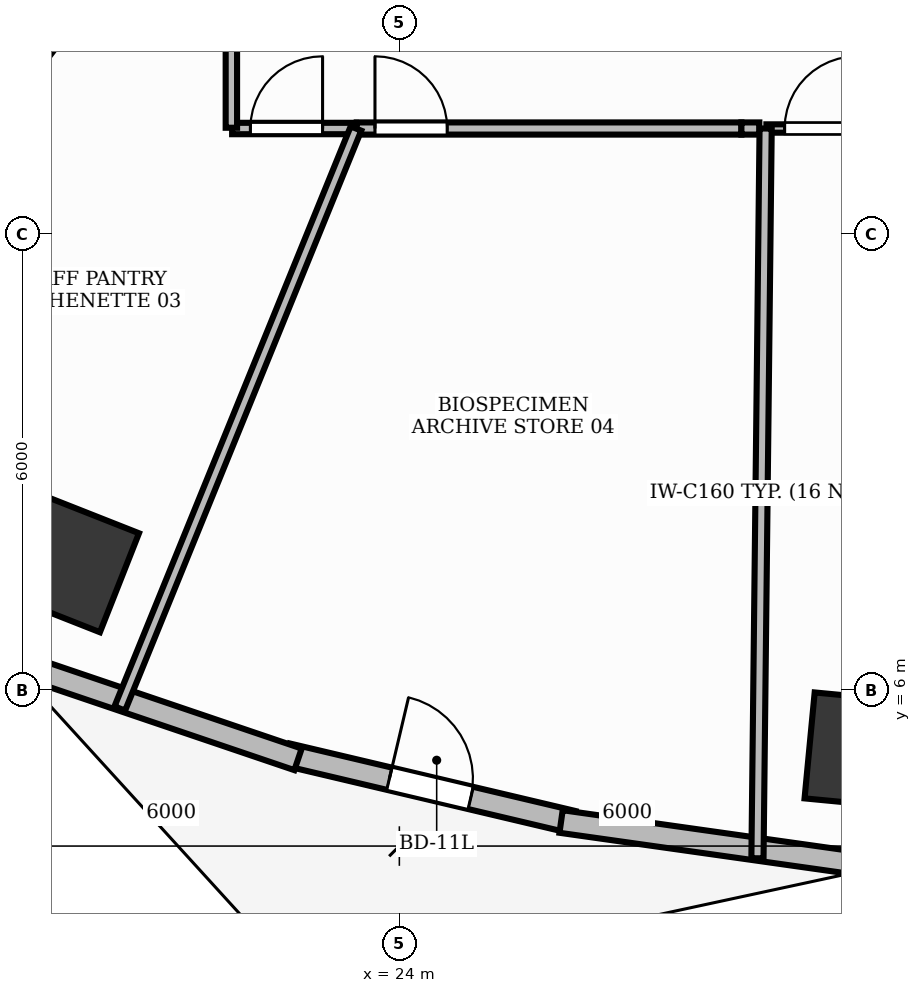
"""IFC4 building model, lengths in metres.
Left out: names, types, materials, properties, quantities, classifications, styles, units other than length and angle.
Written with IfcOpenShell. Run it as: python <this file> out.ifc"""

import sys

from ifc_helpers import new_model, si_unit, direction, frame, frame_2d, origin, origin_2d, place, context, subcontext, project, spatial, rectangle, extrude, element, fill, save


model = new_model("IFC4")
c1 = context("Model", 3, precision=1e-05, world=origin(), true_north=direction((0.0, 1.0)))
c2 = subcontext(c1, "Body", "Model", "MODEL_VIEW")
j1 = project(units=[si_unit("LENGTHUNIT", "METRE"), si_unit("PLANEANGLEUNIT", "RADIAN")], contexts=[c1])
p1 = place(None, origin())
s1 = spatial("IfcSite", under=j1, at=p1, CompositionType="ELEMENT")
p2 = place(p1, origin())
s2 = spatial("IfcBuilding", under=s1, at=p2, CompositionType="ELEMENT")
p3 = place(p2, frame((0.0, 0.0, 42.6)))
s3 = spatial("IfcBuildingStorey", under=s2, at=p3, CompositionType="ELEMENT", Elevation=42.6)
for number, where, z_axis, x_axis in (
    (1, (19.667, 7.671, -0.0), (0.0, 0.0, 1.0), (-0.93, 0.367, 0.0)),
    (2, (30.094, 5.208, -0.0), (0.0, 0.0, 1.0), (-0.995, 0.095, 0.0)),
):
    element("IfcColumn", number, at=place(p3, frame(where, z_axis=z_axis, x_axis=x_axis)), inside=s3, PredefinedType="COLUMN", context=c2, shape_type="SweptSolid", body=[
        extrude(rectangle(XDim=1.4, YDim=1.4, at=origin_2d()), origin(), (0.0, 0.0, 1.0), 3.901),
    ])
p4 = place(p3, frame((22.525, 5.153, 0.0), z_axis=(0.0, 0.0, 1.0), x_axis=(0.973186156802, -0.230018921417, 0.0)))
e3 = element("IfcWall", 3, at=p4, inside=s3, PredefinedType="STANDARD", context=c2, shape_type="SweptSolid", body=[
    extrude(rectangle(XDim=3.861, YDim=0.3, at=frame_2d((1.931, 0.0))), origin(), (0.0, 0.0, 1.0), 3.9),
])
p5 = place(p4, frame((1.381, 0.0, 0.0)))
e4 = element("IfcOpeningElement", 4, at=p5, cuts=e3, PredefinedType="OPENING", context=c2, shape_type="SweptSolid", body=[
    extrude(rectangle(XDim=1.1, YDim=2.15, at=frame_2d((0.55, 1.075))), frame((0.0, 0.165, 0.0), z_axis=(0.0, -1.0, 0.0), x_axis=(1.0, 0.0, 0.0)), (0.0, 0.0, 1.0), 0.33),
])
p6 = place(p3, frame((19.04, 6.321, 0.0), z_axis=(0.0, 0.0, 1.0), x_axis=(0.94702579403, -0.321157508773, 0.0)))
e5 = element("IfcWall", 5, at=p6, inside=s3, PredefinedType="STANDARD", context=c2, shape_type="SweptSolid", body=[
    extrude(rectangle(XDim=3.83, YDim=0.3, at=frame_2d((1.915, 0.0))), origin(), (0.0, 0.0, 1.0), 3.9),
])
p7 = place(p3, frame((26.128, 4.273, 0.0), z_axis=(0.0, 0.0, 1.0), x_axis=(0.990165832998, -0.139898617443, 0.0)))
e6 = element("IfcWall", 6, at=p7, inside=s3, PredefinedType="STANDARD", context=c2, shape_type="SweptSolid", body=[
    extrude(rectangle(XDim=3.951, YDim=0.3, at=frame_2d((1.976, 0.0))), origin(), (0.0, 0.0, 1.0), 3.9),
])
p8 = place(p3, frame((21.8, 13.39, 0.0), z_axis=(0.0, 0.0, 1.0), x_axis=(1.0, 0.0, 0.0)))
e7 = element("IfcWall", 7, at=p8, inside=s3, PredefinedType="PARTITIONING", context=c2, shape_type="SweptSolid", body=[
    extrude(rectangle(XDim=1.629, YDim=0.15, at=frame_2d((0.814, 0.0))), origin(), (0.0, 0.0, 1.0), 2.91),
])
p9 = place(p8, frame((0.24, 0.0, 0.0)))
e8 = element("IfcOpeningElement", 8, at=p9, cuts=e7, PredefinedType="OPENING", context=c2, shape_type="SweptSolid", body=[
    extrude(rectangle(XDim=0.95, YDim=2.15, at=frame_2d((0.475, 1.075))), frame((0.0, 0.09, 0.0), z_axis=(0.0, -1.0, 0.0), x_axis=(1.0, 0.0, 0.0)), (0.0, 0.0, 1.0), 0.18),
])
p10 = place(p3, frame((23.439, 13.39, 0.0), z_axis=(0.0, 0.0, 1.0), x_axis=(1.0, 0.0, 0.0)))
e9 = element("IfcWall", 9, at=p10, inside=s3, PredefinedType="PARTITIONING", context=c2, shape_type="SweptSolid", body=[
    extrude(rectangle(XDim=5.061, YDim=0.16, at=frame_2d((2.53, 0.0))), origin(), (0.0, 0.0, 1.0), 2.91),
])
p11 = place(p10, frame((0.24, 0.0, 0.0)))
e10 = element("IfcOpeningElement", 10, at=p11, cuts=e9, PredefinedType="OPENING", context=c2, shape_type="SweptSolid", body=[
    extrude(rectangle(XDim=0.95, YDim=2.15, at=frame_2d((0.475, 1.075))), frame((0.0, 0.095, 0.0), z_axis=(0.0, -1.0, 0.0), x_axis=(1.0, 0.0, 0.0)), (0.0, 0.0, 1.0), 0.19),
])
p12 = place(p3, frame((28.829, 13.39, 0.0), z_axis=(0.0, 0.0, 1.0), x_axis=(1.0, 0.0, 0.0)))
e11 = element("IfcWall", 11, at=p12, inside=s3, PredefinedType="MOVABLE", context=c2, shape_type="SweptSolid", body=[
    extrude(rectangle(XDim=5.819, YDim=0.11, at=frame_2d((2.91, 0.0))), origin(), (0.0, 0.0, 1.0), 2.91),
])
p13 = place(p12, frame((0.24, 0.0, 0.0)))
e12 = element("IfcOpeningElement", 12, at=p13, cuts=e11, PredefinedType="OPENING", context=c2, shape_type="SweptSolid", body=[
    extrude(rectangle(XDim=0.95, YDim=2.15, at=frame_2d((0.475, 1.075))), frame((0.0, 0.07, 0.0), z_axis=(0.0, -1.0, 0.0), x_axis=(1.0, 0.0, 0.0)), (0.0, 0.0, 1.0), 0.14),
])
p14 = place(p3, frame((21.79, 17.598, 0.0), z_axis=(0.0, 0.0, 1.0), x_axis=(-0.606985155119, -0.794713169304, 0.0)))
e13 = element("IfcWall", 13, at=p14, inside=s3, PredefinedType="PARTITIONING", context=c2, shape_type="SweptSolid", body=[
    extrude(rectangle(XDim=11.677, YDim=0.15, at=frame_2d((5.839, 0.0))), origin(), (0.0, 0.0, 1.0), 2.91),
])
p15 = place(p3, frame((21.79, 17.581, 0.0), z_axis=(0.0, 0.0, 1.0), x_axis=(0.0, -1.0, 0.0)))
e14 = element("IfcWall", 14, at=p15, inside=s3, PredefinedType="PARTITIONING", context=c2, shape_type="SweptSolid", body=[
    extrude(rectangle(XDim=4.181, YDim=0.15, at=frame_2d((2.091, 0.0))), origin(), (0.0, 0.0, 1.0), 2.91),
])
p16 = place(p3, frame((23.429, 13.39, 0.0), z_axis=(0.0, 0.0, 1.0), x_axis=(-0.377151920135, -0.926151407243, 0.0)))
e15 = element("IfcWall", 15, at=p16, inside=s3, PredefinedType="PARTITIONING", context=c2, shape_type="SweptSolid", body=[
    extrude(rectangle(XDim=8.239, YDim=0.15, at=frame_2d((4.119, 0.0))), origin(), (0.0, 0.0, 1.0), 2.91),
])
p17 = place(p3, frame((28.5, 13.39, 0.0), z_axis=(0.0, 0.0, 1.0), x_axis=(1.0, 0.0, 0.0)))
e16 = element("IfcWall", 16, at=p17, inside=s3, PredefinedType="PARTITIONING", context=c2, shape_type="SweptSolid", body=[
    extrude(rectangle(XDim=0.236, YDim=0.16, at=frame_2d((0.118, 0.0))), origin(), (0.0, 0.0, 1.0), 2.91),
])
p18 = place(p3, frame((28.819, 13.39, 0.0), z_axis=(0.0, 0.0, 1.0), x_axis=(-0.011213820346, -0.99993712314, 0.0)))
e17 = element("IfcWall", 17, at=p18, inside=s3, PredefinedType="PARTITIONING", context=c2, shape_type="SweptSolid", body=[
    extrude(rectangle(XDim=9.601, YDim=0.16, at=frame_2d((4.801, 0.0))), origin(), (0.0, 0.0, 1.0), 2.91),
])
p19 = place(p5, origin())
e18 = element("IfcDoor", 18, at=p19, inside=s3, OperationType="SINGLE_SWING_LEFT", PredefinedType="DOOR", context=c2, shape_type="SweptSolid", body=[
    extrude(rectangle(XDim=1.1, YDim=2.15, at=frame_2d((0.55, 1.075))), frame((0.0, 0.025, 0.0), z_axis=(0.0, -1.0, 0.0), x_axis=(1.0, 0.0, 0.0)), (0.0, 0.0, 1.0), 0.05),
])
fill(e4, e18)
p20 = place(p9, origin())
e19 = element("IfcDoor", 19, at=p20, inside=s3, OperationType="SINGLE_SWING_RIGHT", PredefinedType="DOOR", context=c2, shape_type="SweptSolid", body=[
    extrude(rectangle(XDim=0.95, YDim=2.15, at=frame_2d((0.475, 1.075))), frame((0.0, 0.025, 0.0), z_axis=(0.0, -1.0, 0.0), x_axis=(1.0, 0.0, 0.0)), (0.0, 0.0, 1.0), 0.05),
])
fill(e8, e19)
p21 = place(p11, origin())
e20 = element("IfcDoor", 20, at=p21, inside=s3, OperationType="SINGLE_SWING_LEFT", PredefinedType="DOOR", context=c2, shape_type="SweptSolid", body=[
    extrude(rectangle(XDim=0.95, YDim=2.15, at=frame_2d((0.475, 1.075))), frame((0.0, 0.025, 0.0), z_axis=(0.0, -1.0, 0.0), x_axis=(1.0, 0.0, 0.0)), (0.0, 0.0, 1.0), 0.05),
])
fill(e10, e20)
p22 = place(p13, origin())
e21 = element("IfcDoor", 21, at=p22, inside=s3, OperationType="SINGLE_SWING_RIGHT", PredefinedType="DOOR", context=c2, shape_type="SweptSolid", body=[
    extrude(rectangle(XDim=0.95, YDim=2.15, at=frame_2d((0.475, 1.075))), frame((0.0, 0.025, 0.0), z_axis=(0.0, -1.0, 0.0), x_axis=(1.0, 0.0, 0.0)), (0.0, 0.0, 1.0), 0.05),
])
fill(e12, e21)
save(model, sys.argv[1])
